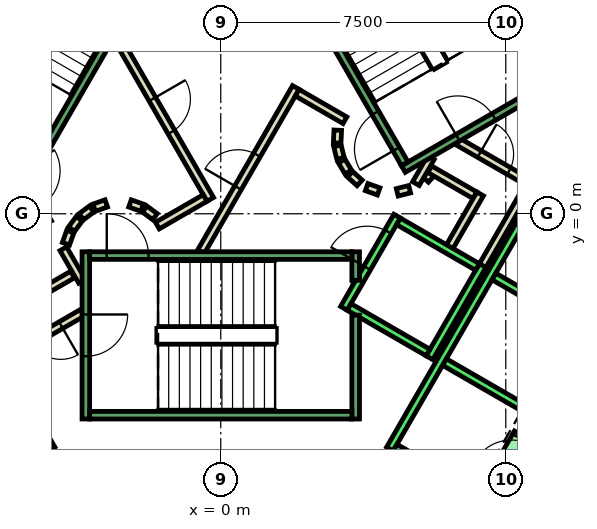
"""IFC4 building model, lengths in metres.
Left out: names, types, materials, properties, quantities, classifications, styles, units other than length and angle.
Written with IfcOpenShell. Run it as: python <this file> out.ifc"""

import sys

from ifc_helpers import new_model, si_unit, direction, frame, frame_2d, origin, place, context, subcontext, project, spatial, polyline, rectangle, outline, extrude, element, fill, save


model = new_model("IFC4")
c1 = context("Model", 3, precision=1e-05, world=origin(), true_north=direction((0.0, 1.0)))
c2 = subcontext(c1, "Body", "Model", "MODEL_VIEW")
j1 = project(units=[si_unit("LENGTHUNIT", "METRE"), si_unit("PLANEANGLEUNIT", "RADIAN")], contexts=[c1])
p1 = place(None, origin())
s1 = spatial("IfcSite", under=j1, at=p1, CompositionType="ELEMENT")
p2 = place(p1, origin())
s2 = spatial("IfcBuilding", under=s1, at=p2, CompositionType="ELEMENT")
p3 = place(p2, frame((0.0, 0.0, 99.2)))
s3 = spatial("IfcBuildingStorey", under=s2, at=p3, CompositionType="ELEMENT", Elevation=99.2)
p4 = place(p3, frame((0.0, 0.0, -0.4)))
e1 = element("IfcWall", 1, at=p4, inside=s3, PredefinedType="SHEAR", context=c2, shape_type="SweptSolid", body=[
    extrude(outline(polyline([(8.517, 11.748), (7.738, 11.298), (12.817, 2.5), (13.856, 2.5), (8.517, 11.748)])), origin(), (0.0, 0.0, 1.0), 4.2),
])
p5 = place(p3, frame((0.0, 0.0, 3.6)))
e2 = element("IfcWall", 2, at=p5, inside=s3, PredefinedType="SHEAR", context=c2, shape_type="SweptSolid", body=[
    extrude(outline(polyline([(8.767, -6.314), (7.988, -5.864), (7.338, -6.99), (8.117, -7.44), (8.767, -6.314)])), origin(), (0.0, 0.0, 1.0), 0.2),
])
p6 = place(p3, frame((5.39, 0.898, 0.0), z_axis=(0.0, 0.0, 1.0), x_axis=(0.673828488714, 0.738887791073, 0.0)))
e3 = element("IfcWall", 3, at=p6, inside=s3, PredefinedType="PARTITIONING", context=c2, shape_type="SweptSolid", body=[
    extrude(rectangle(XDim=0.263, YDim=0.2, at=frame_2d((0.131, 0.0))), origin(), (0.0, 0.0, 1.0), 3.8),
])
p7 = place(p3, frame((5.499, 1.172, 0.0), z_axis=(0.0, 0.0, 1.0), x_axis=(0.866333505267, -0.499465972466, 0.0)))
e4 = element("IfcWall", 4, at=p7, inside=s3, PredefinedType="PARTITIONING", context=c2, shape_type="SweptSolid", body=[
    extrude(rectangle(XDim=1.374, YDim=0.2, at=frame_2d((0.687, 0.0))), origin(), (0.0, 0.0, 1.0), 3.8),
])
p8 = place(p3, frame((6.826, 0.522, 0.0), z_axis=(0.0, 0.0, 1.0), x_axis=(-0.500016722714, -0.866015748706, 0.0)))
e5 = element("IfcWall", 5, at=p8, inside=s3, PredefinedType="PARTITIONING", context=c2, shape_type="SweptSolid", body=[
    extrude(rectangle(XDim=1.7, YDim=0.2, at=frame_2d((0.85, 0.0))), origin(), (0.0, 0.0, 1.0), 3.8),
])
p9 = place(p3, frame((6.25, 1.894, 0.0), z_axis=(0.0, 0.0, 1.0), x_axis=(0.866043184279, -0.499969202016, 0.0)))
e6 = element("IfcWall", 6, at=p9, inside=s3, PredefinedType="PARTITIONING", context=c2, shape_type="SweptSolid", body=[
    extrude(rectangle(XDim=2.084, YDim=0.2, at=frame_2d((1.042, 0.0))), origin(), (0.0, 0.0, 1.0), 3.8),
])
p10 = place(p9, frame((0.642, 0.0, 0.0)))
e7 = element("IfcOpeningElement", 7, at=p10, cuts=e6, PredefinedType="OPENING", context=c2, shape_type="SweptSolid", body=[
    extrude(rectangle(XDim=0.9, YDim=2.1, at=frame_2d((0.45, 1.05))), frame((0.0, 0.11, 0.0), z_axis=(0.0, -1.0, 0.0), x_axis=(1.0, 0.0, 0.0)), (0.0, 0.0, 1.0), 0.22),
])
p11 = place(p3, frame((8.192, 0.888, 0.0), z_axis=(0.0, 0.0, 1.0), x_axis=(-0.499940625693, -0.866059680843, 0.0)))
e8 = element("IfcWall", 8, at=p11, inside=s3, PredefinedType="PARTITIONING", context=c2, shape_type="SweptSolid", body=[
    extrude(rectangle(XDim=2.68, YDim=0.2, at=frame_2d((1.34, 0.0))), origin(), (0.0, 0.0, 1.0), 3.8),
])
p12 = place(p3, frame((5.135, 0.793, 0.0), z_axis=(0.0, 0.0, 1.0), x_axis=(0.499526442893, 0.866298639529, 0.0)))
e9 = element("IfcWall", 9, at=p12, inside=s3, PredefinedType="PARTITIONING", context=c2, shape_type="SweptSolid", body=[
    extrude(rectangle(XDim=0.791, YDim=0.2, at=frame_2d((0.396, 0.0))), origin(), (0.0, 0.0, 1.0), 3.8),
])
p13 = place(p3, frame((-3.9, -1.599, 0.0), z_axis=(0.0, 0.0, 1.0), x_axis=(-0.865969445389, -0.500096910261, 0.0)))
e10 = element("IfcWall", 10, at=p13, inside=s3, PredefinedType="PARTITIONING", context=c2, shape_type="SweptSolid", body=[
    extrude(rectangle(XDim=1.373, YDim=0.2, at=frame_2d((0.687, 0.0))), origin(), (0.0, 0.0, 1.0), 3.8),
])
p14 = place(p3, frame((-3.65, -2.61, 0.0), z_axis=(0.0, 0.0, 1.0), x_axis=(-0.866072462134, -0.499918483688, 0.0)))
e11 = element("IfcWall", 11, at=p14, inside=s3, PredefinedType="PARTITIONING", context=c2, shape_type="SweptSolid", body=[
    extrude(rectangle(XDim=2.084, YDim=0.2, at=frame_2d((1.042, 0.0))), origin(), (0.0, 0.0, 1.0), 3.8),
])
p15 = place(p14, frame((0.642, 0.0, 0.0)))
e12 = element("IfcOpeningElement", 12, at=p15, cuts=e11, PredefinedType="OPENING", context=c2, shape_type="SweptSolid", body=[
    extrude(rectangle(XDim=0.9, YDim=2.1, at=frame_2d((0.45, 1.05))), frame((0.0, 0.11, 0.0), z_axis=(0.0, -1.0, 0.0), x_axis=(1.0, 0.0, 0.0)), (0.0, 0.0, 1.0), 0.22),
])
p16 = place(p3, frame((-4.145, -0.92, 0.0), z_axis=(0.0, 0.0, 1.0), x_axis=(0.499743786207, -0.866173278362, 0.0)))
e13 = element("IfcWall", 13, at=p16, inside=s3, PredefinedType="PARTITIONING", context=c2, shape_type="SweptSolid", body=[
    extrude(rectangle(XDim=0.991, YDim=0.2, at=frame_2d((0.495, 0.0))), origin(), (0.0, 0.0, 1.0), 3.8),
])
p17 = place(p3, frame((-0.52, -1.0, 0.0), z_axis=(0.0, 0.0, 1.0), x_axis=(0.50011622646, 0.865958290007, 0.0)))
e14 = element("IfcWall", 14, at=p17, inside=s3, PredefinedType="PARTITIONING", context=c2, shape_type="SweptSolid", body=[
    extrude(rectangle(XDim=4.991, YDim=0.2, at=frame_2d((2.496, 0.0))), origin(), (0.0, 0.0, 1.0), 3.8),
])
p18 = place(p17, frame((1.945, 0.0, 0.0)))
e15 = element("IfcOpeningElement", 15, at=p18, cuts=e14, PredefinedType="OPENING", context=c2, shape_type="SweptSolid", body=[
    extrude(rectangle(XDim=1.0, YDim=2.1, at=frame_2d((0.5, 1.05))), frame((0.0, 0.11, 0.0), z_axis=(0.0, -1.0, 0.0), x_axis=(1.0, 0.0, 0.0)), (0.0, 0.0, 1.0), 0.22),
])
p19 = place(p3, frame((2.012, 3.186, 0.0), z_axis=(0.0, 0.0, 1.0), x_axis=(0.865891012941, -0.500232699559, 0.0)))
e16 = element("IfcWall", 16, at=p19, inside=s3, PredefinedType="PARTITIONING", context=c2, shape_type="SweptSolid", body=[
    extrude(rectangle(XDim=1.449, YDim=0.2, at=frame_2d((0.725, 0.0))), origin(), (0.0, 0.0, 1.0), 3.8),
])
p20 = place(p3, frame((3.079, 2.199, 0.0), z_axis=(0.0, 0.0, 1.0), x_axis=(-0.047771483479, -0.998858290933, 0.0)))
e17 = element("IfcWall", 17, at=p20, inside=s3, PredefinedType="PARTITIONING", context=c2, shape_type="SweptSolid", body=[
    extrude(rectangle(XDim=0.337, YDim=0.2, at=frame_2d((0.169, 0.0))), origin(), (0.0, 0.0, 1.0), 3.8),
])
p21 = place(p3, frame((3.07, 1.786, 0.0), z_axis=(0.0, 0.0, 1.0), x_axis=(0.242705583207, -0.970099994784, 0.0)))
e18 = element("IfcWall", 18, at=p21, inside=s3, PredefinedType="PARTITIONING", context=c2, shape_type="SweptSolid", body=[
    extrude(rectangle(XDim=0.338, YDim=0.2, at=frame_2d((0.169, 0.0))), origin(), (0.0, 0.0, 1.0), 3.8),
])
for number, where, z_axis, x_axis in (
    (19, (3.182, 1.388, 0.0), (0.0, 0.0, 1.0), (0.512, -0.859, 0.0)),
    (20, (3.404, 1.039, 0.0), (0.0, 0.0, 1.0), (0.74, -0.672, 0.0)),
):
    element("IfcWall", number, at=place(p3, frame(where, z_axis=z_axis, x_axis=x_axis)), inside=s3, PredefinedType="PARTITIONING", context=c2, shape_type="SweptSolid", body=[
        extrude(rectangle(XDim=0.338, YDim=0.2, at=frame_2d((0.169, 0.0))), origin(), (0.0, 0.0, 1.0), 3.8),
    ])
p22 = place(p3, frame((3.838, 0.702, 0.0), z_axis=(0.0, 0.0, 1.0), x_axis=(0.941035081519, -0.338308993895, 0.0)))
e21 = element("IfcWall", 21, at=p22, inside=s3, PredefinedType="PARTITIONING", context=c2, shape_type="SweptSolid", body=[
    extrude(rectangle(XDim=0.337, YDim=0.2, at=frame_2d((0.168, 0.0))), origin(), (0.0, 0.0, 1.0), 3.8),
])
p23 = place(p3, frame((4.644, 0.564, 0.0), z_axis=(0.0, 0.0, 1.0), x_axis=(0.969929076366, 0.243387729394, 0.0)))
e22 = element("IfcWall", 22, at=p23, inside=s3, PredefinedType="PARTITIONING", context=c2, shape_type="SweptSolid", body=[
    extrude(rectangle(XDim=0.337, YDim=0.2, at=frame_2d((0.168, 0.0))), origin(), (0.0, 0.0, 1.0), 3.8),
])
p24 = place(p3, frame((-2.771, 4.7, 0.0), z_axis=(0.0, 0.0, 1.0), x_axis=(0.499969479948, -0.866043023828, 0.0)))
e23 = element("IfcWall", 23, at=p24, inside=s3, PredefinedType="PARTITIONING", context=c2, shape_type="SweptSolid", body=[
    extrude(rectangle(XDim=4.99, YDim=0.2, at=frame_2d((2.495, 0.0))), origin(), (0.0, 0.0, 1.0), 3.8),
])
p25 = place(p24, frame((1.945, 0.0, 0.0)))
e24 = element("IfcOpeningElement", 24, at=p25, cuts=e23, PredefinedType="OPENING", context=c2, shape_type="SweptSolid", body=[
    extrude(rectangle(XDim=1.0, YDim=2.1, at=frame_2d((0.5, 1.05))), frame((0.0, 0.11, 0.0), z_axis=(0.0, -1.0, 0.0), x_axis=(1.0, 0.0, 0.0)), (0.0, 0.0, 1.0), 0.22),
])
p26 = place(p3, frame((-0.412, 0.414, 0.0), z_axis=(0.0, 0.0, 1.0), x_axis=(-0.866017369001, -0.500013916395, 0.0)))
e25 = element("IfcWall", 25, at=p26, inside=s3, PredefinedType="PARTITIONING", context=c2, shape_type="SweptSolid", body=[
    extrude(rectangle(XDim=1.45, YDim=0.2, at=frame_2d((0.725, 0.0))), origin(), (0.0, 0.0, 1.0), 3.8),
])
p27 = place(p3, frame((-1.731, -0.077, 0.0), z_axis=(0.0, 0.0, 1.0), x_axis=(-0.804311165252, 0.594208338422, 0.0)))
e26 = element("IfcWall", 26, at=p27, inside=s3, PredefinedType="PARTITIONING", context=c2, shape_type="SweptSolid", body=[
    extrude(rectangle(XDim=0.338, YDim=0.2, at=frame_2d((0.169, 0.0))), origin(), (0.0, 0.0, 1.0), 3.8),
])
p28 = place(p3, frame((-2.07, 0.16, 0.0), z_axis=(0.0, 0.0, 1.0), x_axis=(-0.942199461132, 0.335052496547, 0.0)))
e27 = element("IfcWall", 27, at=p28, inside=s3, PredefinedType="PARTITIONING", context=c2, shape_type="SweptSolid", body=[
    extrude(rectangle(XDim=0.337, YDim=0.2, at=frame_2d((0.169, 0.0))), origin(), (0.0, 0.0, 1.0), 3.8),
])
p29 = place(p3, frame((-3.012, 0.273, 0.0), z_axis=(0.0, 0.0, 1.0), x_axis=(-0.942280615813, -0.334824194261, 0.0)))
e28 = element("IfcWall", 28, at=p29, inside=s3, PredefinedType="PARTITIONING", context=c2, shape_type="SweptSolid", body=[
    extrude(rectangle(XDim=0.338, YDim=0.2, at=frame_2d((0.169, 0.0))), origin(), (0.0, 0.0, 1.0), 3.8),
])
p30 = place(p3, frame((-3.397, 0.124, 0.0), z_axis=(0.0, 0.0, 1.0), x_axis=(-0.804311165252, -0.594208338422, 0.0)))
e29 = element("IfcWall", 29, at=p30, inside=s3, PredefinedType="PARTITIONING", context=c2, shape_type="SweptSolid", body=[
    extrude(rectangle(XDim=0.338, YDim=0.2, at=frame_2d((0.169, 0.0))), origin(), (0.0, 0.0, 1.0), 3.8),
])
p31 = place(p3, frame((-3.723, -0.131, 0.0), z_axis=(0.0, 0.0, 1.0), x_axis=(-0.594675113454, -0.803966112121, 0.0)))
e30 = element("IfcWall", 30, at=p31, inside=s3, PredefinedType="PARTITIONING", context=c2, shape_type="SweptSolid", body=[
    extrude(rectangle(XDim=0.338, YDim=0.2, at=frame_2d((0.169, 0.0))), origin(), (0.0, 0.0, 1.0), 3.8),
])
p32 = place(p3, frame((-3.96, -0.47, 0.0), z_axis=(0.0, 0.0, 1.0), x_axis=(-0.334824194261, -0.942280615813, 0.0)))
e31 = element("IfcWall", 31, at=p32, inside=s3, PredefinedType="PARTITIONING", context=c2, shape_type="SweptSolid", body=[
    extrude(rectangle(XDim=0.338, YDim=0.2, at=frame_2d((0.169, 0.0))), origin(), (0.0, 0.0, 1.0), 3.8),
])
p33 = place(p3, frame((-9.751, 2.99, 0.0), z_axis=(0.0, 0.0, 1.0), x_axis=(0.50000090737, -0.866024879913, 0.0)))
e32 = element("IfcWall", 32, at=p33, inside=s3, PredefinedType="STANDARD", context=c2, shape_type="SweptSolid", body=[
    extrude(rectangle(XDim=10.6, YDim=0.2, at=frame_2d((5.3, 0.0))), origin(), (0.0, 0.0, 1.0), 3.8),
])
p34 = place(p3, frame((3.24, -2.488, 0.0), z_axis=(0.0, 0.0, 1.0), x_axis=(0.49994636267, 0.866056369097, 0.0)))
e33 = element("IfcWall", 33, at=p34, inside=s3, PredefinedType="STANDARD", context=c2, shape_type="SweptSolid", body=[
    extrude(rectangle(XDim=2.8, YDim=0.2, at=frame_2d((1.4, 0.0))), origin(), (0.0, 0.0, 1.0), 3.8),
])
p35 = place(p34, frame((1.225, 0.0, 0.0)))
e34 = element("IfcOpeningElement", 34, at=p35, cuts=e33, PredefinedType="OPENING", context=c2, shape_type="SweptSolid", body=[
    extrude(rectangle(XDim=1.1, YDim=2.1, at=frame_2d((0.55, 1.05))), frame((0.0, 0.11, 0.0), z_axis=(0.0, -1.0, 0.0), x_axis=(1.0, 0.0, 0.0)), (0.0, 0.0, 1.0), 0.22),
])
p36 = place(p3, frame((5.492, -3.788, 0.0), z_axis=(0.0, 0.0, 1.0), x_axis=(0.500011755427, 0.866018616679, 0.0)))
e35 = element("IfcWall", 35, at=p36, inside=s3, PredefinedType="STANDARD", context=c2, shape_type="SweptSolid", body=[
    extrude(rectangle(XDim=2.8, YDim=0.2, at=frame_2d((1.4, 0.0))), origin(), (0.0, 0.0, 1.0), 3.8),
])
p37 = place(p3, frame((3.377, -2.452, 0.0), z_axis=(0.0, 0.0, 1.0), x_axis=(0.865955154139, -0.50012165622, 0.0)))
e36 = element("IfcWall", 36, at=p37, inside=s3, PredefinedType="STANDARD", context=c2, shape_type="SweptSolid", body=[
    extrude(rectangle(XDim=2.4, YDim=0.2, at=frame_2d((1.2, 0.0))), origin(), (0.0, 0.0, 1.0), 3.8),
])
p38 = place(p3, frame((4.677, -0.2, 0.0), z_axis=(0.0, 0.0, 1.0), x_axis=(0.865973769406, -0.500089422704, 0.0)))
e37 = element("IfcWall", 37, at=p38, inside=s3, PredefinedType="STANDARD", context=c2, shape_type="SweptSolid", body=[
    extrude(rectangle(XDim=2.399, YDim=0.2, at=frame_2d((1.2, 0.0))), origin(), (0.0, 0.0, 1.0), 3.8),
])
p39 = place(p3, frame((4.451, -6.19, 0.0), z_axis=(0.0, 0.0, 1.0), x_axis=(0.50000090737, 0.866024879913, 0.0)))
e38 = element("IfcWall", 38, at=p39, inside=s3, PredefinedType="STANDARD", context=c2, shape_type="SweptSolid", body=[
    extrude(rectangle(XDim=10.6, YDim=0.2, at=frame_2d((5.3, 0.0))), origin(), (0.0, 0.0, 1.0), 3.8),
])
for number, where, z_axis, x_axis in (
    (39, (4.588, -6.153, 0.0), (0.0, 0.0, 1.0), (0.866, -0.5, 0.0)),
    (40, (5.888, -3.902, 0.0), (0.0, 0.0, 1.0), (0.866, -0.5, 0.0)),
    (41, (7.188, -1.65, 0.0), (0.0, 0.0, 1.0), (0.866, -0.5, 0.0)),
):
    element("IfcWall", number, at=place(p3, frame(where, z_axis=z_axis, x_axis=x_axis)), inside=s3, PredefinedType="STANDARD", context=c2, shape_type="SweptSolid", body=[
        extrude(rectangle(XDim=2.5, YDim=0.2, at=frame_2d((1.25, 0.0))), origin(), (0.0, 0.0, 1.0), 3.8),
    ])
p40 = place(p3, frame((7.598, -7.14, 0.0), z_axis=(0.0, 0.0, 1.0), x_axis=(0.500362116554, 0.865816234728, 0.0)))
e42 = element("IfcWall", 42, at=p40, inside=s3, PredefinedType="STANDARD", context=c2, shape_type="SweptSolid", body=[
    extrude(rectangle(XDim=1.299, YDim=1.2, at=frame_2d((0.65, 0.0))), origin(), (0.0, 0.0, 1.0), 2.4),
])
p41 = place(p40, frame((0.1, 0.0, 0.0)))
e43 = element("IfcOpeningElement", 43, at=p41, cuts=e42, PredefinedType="OPENING", context=c2, shape_type="SweptSolid", body=[
    extrude(rectangle(XDim=1.1, YDim=2.3, at=frame_2d((0.55, 1.15))), frame((0.0, 0.61, 0.0), z_axis=(0.0, -1.0, 0.0), x_axis=(1.0, 0.0, 0.0)), (0.0, 0.0, 1.0), 1.22),
])
p42 = place(p3, frame((-3.55, -1.0, 0.0), z_axis=(0.0, 0.0, 1.0), x_axis=(0.0, -1.0, 0.0)))
e44 = element("IfcWall", 44, at=p42, inside=s3, PredefinedType="STANDARD", context=c2, shape_type="SweptSolid", body=[
    extrude(rectangle(XDim=4.4, YDim=0.2, at=frame_2d((2.2, 0.0))), origin(), (0.0, 0.0, 1.0), 3.8),
])
p43 = place(p42, frame((1.65, 0.0, 0.0)))
e45 = element("IfcOpeningElement", 45, at=p43, cuts=e44, PredefinedType="OPENING", context=c2, shape_type="SweptSolid", body=[
    extrude(rectangle(XDim=1.1, YDim=2.2, at=frame_2d((0.55, 1.1))), frame((0.0, 0.11, 0.0), z_axis=(0.0, -1.0, 0.0), x_axis=(1.0, 0.0, 0.0)), (0.0, 0.0, 1.0), 0.22),
])
p44 = place(p3, frame((3.55, -2.667, 0.0), z_axis=(0.0, 0.0, 1.0), x_axis=(0.0, -1.0, 0.0)))
e46 = element("IfcWall", 46, at=p44, inside=s3, PredefinedType="STANDARD", context=c2, shape_type="SweptSolid", body=[
    extrude(rectangle(XDim=2.733, YDim=0.2, at=frame_2d((1.366, 0.0))), origin(), (0.0, 0.0, 1.0), 3.8),
])
p45 = place(p3, frame((3.55, -1.0, 0.0), z_axis=(0.0, 0.0, 1.0), x_axis=(0.0, -1.0, 0.0)))
e47 = element("IfcWall", 47, at=p45, inside=s3, PredefinedType="STANDARD", context=c2, shape_type="SweptSolid", body=[
    extrude(rectangle(XDim=0.751, YDim=0.2, at=frame_2d((0.375, 0.0))), origin(), (0.0, 0.0, 1.0), 3.8),
])
p46 = place(p3, frame((-3.45, -1.1, 0.0), z_axis=(0.0, 0.0, 1.0), x_axis=(1.0, 0.0, 0.0)))
e48 = element("IfcWall", 48, at=p46, inside=s3, PredefinedType="STANDARD", context=c2, shape_type="SweptSolid", body=[
    extrude(rectangle(XDim=6.9, YDim=0.2, at=frame_2d((3.45, 0.0))), origin(), (0.0, 0.0, 1.0), 3.8),
])
p47 = place(p46, frame((0.45, 0.0, 0.0)))
e49 = element("IfcOpeningElement", 49, at=p47, cuts=e48, PredefinedType="OPENING", context=c2, shape_type="SweptSolid", body=[
    extrude(rectangle(XDim=1.1, YDim=2.2, at=frame_2d((0.55, 1.1))), frame((0.0, 0.11, 0.0), z_axis=(0.0, -1.0, 0.0), x_axis=(1.0, 0.0, 0.0)), (0.0, 0.0, 1.0), 0.22),
])
p48 = place(p3, frame((-3.45, -5.3, 0.0), z_axis=(0.0, 0.0, 1.0), x_axis=(1.0, 0.0, 0.0)))
e50 = element("IfcWall", 50, at=p48, inside=s3, PredefinedType="STANDARD", context=c2, shape_type="SweptSolid", body=[
    extrude(rectangle(XDim=6.9, YDim=0.2, at=frame_2d((3.45, 0.0))), origin(), (0.0, 0.0, 1.0), 3.8),
])
p49 = place(p3, frame((4.806, 1.176, 0.0), z_axis=(0.0, 0.0, 1.0), x_axis=(0.866059941101, 0.499940174841, 0.0)))
e51 = element("IfcWall", 51, at=p49, inside=s3, PredefinedType="STANDARD", context=c2, shape_type="SweptSolid", body=[
    extrude(rectangle(XDim=4.4, YDim=0.2, at=frame_2d((2.2, 0.0))), origin(), (0.0, 0.0, 1.0), 3.8),
])
p50 = place(p49, frame((1.65, 0.0, 0.0)))
e52 = element("IfcOpeningElement", 52, at=p50, cuts=e51, PredefinedType="OPENING", context=c2, shape_type="SweptSolid", body=[
    extrude(rectangle(XDim=1.1, YDim=2.2, at=frame_2d((0.55, 1.1))), frame((0.0, 0.11, 0.0), z_axis=(0.0, -1.0, 0.0), x_axis=(1.0, 0.0, 0.0)), (0.0, 0.0, 1.0), 0.22),
])
p51 = place(p3, frame((4.843, 1.312, 0.0), z_axis=(0.0, 0.0, 1.0), x_axis=(-0.499963383562, 0.866046543262, 0.0)))
e53 = element("IfcWall", 53, at=p51, inside=s3, PredefinedType="STANDARD", context=c2, shape_type="SweptSolid", body=[
    extrude(rectangle(XDim=6.9, YDim=0.2, at=frame_2d((3.45, 0.0))), origin(), (0.0, 0.0, 1.0), 3.8),
])
p52 = place(p51, frame((0.45, 0.0, 0.0)))
e54 = element("IfcOpeningElement", 54, at=p52, cuts=e53, PredefinedType="OPENING", context=c2, shape_type="SweptSolid", body=[
    extrude(rectangle(XDim=1.1, YDim=2.2, at=frame_2d((0.55, 1.1))), frame((0.0, 0.11, 0.0), z_axis=(0.0, -1.0, 0.0), x_axis=(1.0, 0.0, 0.0)), (0.0, 0.0, 1.0), 0.22),
])
p53 = place(p3, frame((8.48, 3.412, 0.0), z_axis=(0.0, 0.0, 1.0), x_axis=(-0.499978703459, 0.866037698999, 0.0)))
e55 = element("IfcWall", 55, at=p53, inside=s3, PredefinedType="STANDARD", context=c2, shape_type="SweptSolid", body=[
    extrude(rectangle(XDim=6.9, YDim=0.2, at=frame_2d((3.45, 0.0))), origin(), (0.0, 0.0, 1.0), 3.8),
])
p54 = place(p3, frame((-1.393, 7.288, 0.0), z_axis=(0.0, 0.0, 1.0), x_axis=(-0.499963383562, -0.866046543262, 0.0)))
e56 = element("IfcWall", 56, at=p54, inside=s3, PredefinedType="STANDARD", context=c2, shape_type="SweptSolid", body=[
    extrude(rectangle(XDim=6.9, YDim=0.2, at=frame_2d((3.45, 0.0))), origin(), (0.0, 0.0, 1.0), 3.8),
])
p55 = place(p54, frame((0.45, 0.0, 0.0)))
e57 = element("IfcOpeningElement", 57, at=p55, cuts=e56, PredefinedType="OPENING", context=c2, shape_type="SweptSolid", body=[
    extrude(rectangle(XDim=1.1, YDim=2.2, at=frame_2d((0.55, 1.1))), frame((0.0, 0.11, 0.0), z_axis=(0.0, -1.0, 0.0), x_axis=(1.0, 0.0, 0.0)), (0.0, 0.0, 1.0), 0.22),
])
p56 = place(p18, origin())
e58 = element("IfcDoor", 58, at=p56, inside=s3, OperationType="SINGLE_SWING_LEFT", PredefinedType="DOOR", context=c2, shape_type="SweptSolid", body=[
    extrude(rectangle(XDim=1.0, YDim=2.1, at=frame_2d((0.5, 1.05))), frame((0.0, 0.025, 0.0), z_axis=(0.0, -1.0, 0.0), x_axis=(1.0, 0.0, 0.0)), (0.0, 0.0, 1.0), 0.05),
])
fill(e15, e58)
p57 = place(p25, origin())
e59 = element("IfcDoor", 59, at=p57, inside=s3, OperationType="SINGLE_SWING_RIGHT", PredefinedType="DOOR", context=c2, shape_type="SweptSolid", body=[
    extrude(rectangle(XDim=1.0, YDim=2.1, at=frame_2d((0.5, 1.05))), frame((0.0, 0.025, 0.0), z_axis=(0.0, -1.0, 0.0), x_axis=(1.0, 0.0, 0.0)), (0.0, 0.0, 1.0), 0.05),
])
fill(e24, e59)
p58 = place(p10, origin())
e60 = element("IfcDoor", 60, at=p58, inside=s3, OperationType="SINGLE_SWING_LEFT", PredefinedType="DOOR", context=c2, shape_type="SweptSolid", body=[
    extrude(rectangle(XDim=0.9, YDim=2.1, at=frame_2d((0.45, 1.05))), frame((0.0, 0.025, 0.0), z_axis=(0.0, -1.0, 0.0), x_axis=(1.0, 0.0, 0.0)), (0.0, 0.0, 1.0), 0.05),
])
fill(e7, e60)
p59 = place(p15, origin())
e61 = element("IfcDoor", 61, at=p59, inside=s3, OperationType="SINGLE_SWING_LEFT", PredefinedType="DOOR", context=c2, shape_type="SweptSolid", body=[
    extrude(rectangle(XDim=0.9, YDim=2.1, at=frame_2d((0.45, 1.05))), frame((0.0, 0.025, 0.0), z_axis=(0.0, -1.0, 0.0), x_axis=(1.0, 0.0, 0.0)), (0.0, 0.0, 1.0), 0.05),
])
fill(e12, e61)
p60 = place(p41, origin())
e62 = element("IfcDoor", 62, at=p60, inside=s3, OperationType="SLIDING_TO_LEFT", PredefinedType="DOOR", context=c2, shape_type="SweptSolid", body=[
    extrude(rectangle(XDim=1.1, YDim=2.3, at=frame_2d((0.55, 1.15))), frame((0.0, 0.025, 0.0), z_axis=(0.0, -1.0, 0.0), x_axis=(1.0, 0.0, 0.0)), (0.0, 0.0, 1.0), 0.05),
])
fill(e43, e62)
p61 = place(p35, origin())
e63 = element("IfcDoor", 63, at=p61, inside=s3, OperationType="SLIDING_TO_LEFT", PredefinedType="DOOR", context=c2, shape_type="SweptSolid", body=[
    extrude(rectangle(XDim=1.1, YDim=2.1, at=frame_2d((0.55, 1.05))), frame((0.0, 0.025, 0.0), z_axis=(0.0, -1.0, 0.0), x_axis=(1.0, 0.0, 0.0)), (0.0, 0.0, 1.0), 0.05),
])
fill(e34, e63)
p62 = place(p47, origin())
e64 = element("IfcDoor", 64, at=p62, inside=s3, OperationType="SINGLE_SWING_LEFT", PredefinedType="DOOR", context=c2, shape_type="SweptSolid", body=[
    extrude(rectangle(XDim=1.1, YDim=2.2, at=frame_2d((0.55, 1.1))), frame((0.0, 0.025, 0.0), z_axis=(0.0, -1.0, 0.0), x_axis=(1.0, 0.0, 0.0)), (0.0, 0.0, 1.0), 0.05),
])
fill(e49, e64)
p63 = place(p43, origin())
e65 = element("IfcDoor", 65, at=p63, inside=s3, OperationType="SINGLE_SWING_LEFT", PredefinedType="DOOR", context=c2, shape_type="SweptSolid", body=[
    extrude(rectangle(XDim=1.1, YDim=2.2, at=frame_2d((0.55, 1.1))), frame((0.0, 0.025, 0.0), z_axis=(0.0, -1.0, 0.0), x_axis=(1.0, 0.0, 0.0)), (0.0, 0.0, 1.0), 0.05),
])
fill(e45, e65)
p64 = place(p52, origin())
e66 = element("IfcDoor", 66, at=p64, inside=s3, OperationType="SINGLE_SWING_LEFT", PredefinedType="DOOR", context=c2, shape_type="SweptSolid", body=[
    extrude(rectangle(XDim=1.1, YDim=2.2, at=frame_2d((0.55, 1.1))), frame((0.0, 0.025, 0.0), z_axis=(0.0, -1.0, 0.0), x_axis=(1.0, 0.0, 0.0)), (0.0, 0.0, 1.0), 0.05),
])
fill(e54, e66)
p65 = place(p50, origin())
e67 = element("IfcDoor", 67, at=p65, inside=s3, OperationType="SINGLE_SWING_LEFT", PredefinedType="DOOR", context=c2, shape_type="SweptSolid", body=[
    extrude(rectangle(XDim=1.1, YDim=2.2, at=frame_2d((0.55, 1.1))), frame((0.0, 0.025, 0.0), z_axis=(0.0, -1.0, 0.0), x_axis=(1.0, 0.0, 0.0)), (0.0, 0.0, 1.0), 0.05),
])
fill(e52, e67)
save(model, sys.argv[1])
